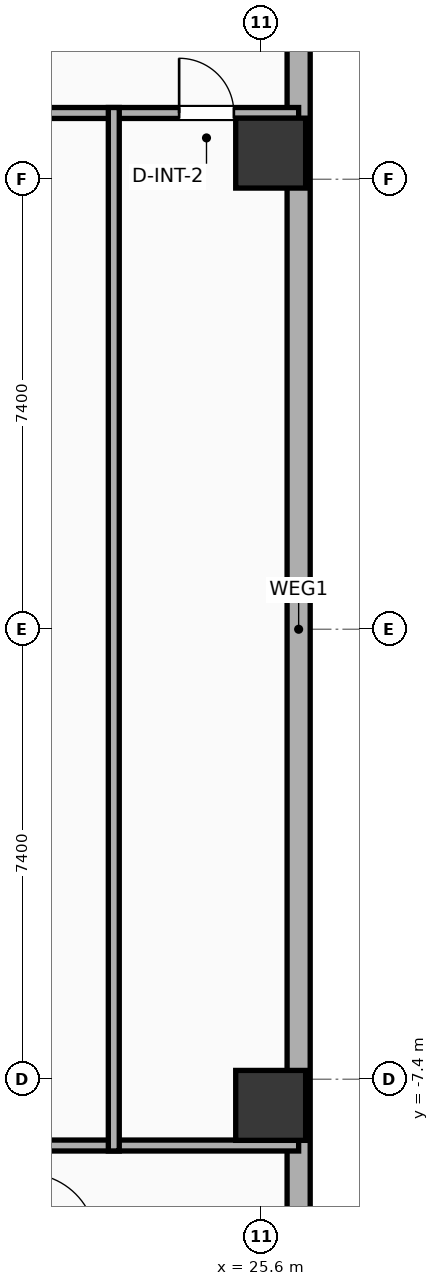
"""IFC4 building model, lengths in metres.
Left out: names, types, materials, properties, quantities, classifications, styles, units other than length and angle.
Written with IfcOpenShell. Run it as: python <this file> out.ifc"""

import sys

from ifc_helpers import new_model, si_unit, direction, frame, frame_2d, origin, origin_2d, place, context, subcontext, project, spatial, rectangle, hollow_rectangle, extrude, element, fill, save


model = new_model("IFC4")
c1 = context("Model", 3, precision=1e-05, world=origin(), true_north=direction((0.0, 1.0)))
c2 = subcontext(c1, "Body", "Model", "MODEL_VIEW")
j1 = project(units=[si_unit("LENGTHUNIT", "METRE"), si_unit("PLANEANGLEUNIT", "RADIAN")], contexts=[c1])
p1 = place(None, origin())
s1 = spatial("IfcSite", under=j1, at=p1, CompositionType="ELEMENT")
p2 = place(p1, origin())
s2 = spatial("IfcBuilding", under=s1, at=p2, CompositionType="ELEMENT")
p3 = place(p2, frame((0.0, 0.0, 68.9)))
s3 = spatial("IfcBuildingStorey", under=s2, at=p3, CompositionType="ELEMENT", Elevation=68.9)
for number, where, z_axis, x_axis in (
    (1, (25.75, -7.83, 0.0), (0.0, 0.0, 1.0), (1.0, 0.0, 0.0)),
    (2, (25.75, 7.83, 0.0), (0.0, 0.0, 1.0), (1.0, 0.0, 0.0)),
):
    element("IfcColumn", number, at=place(p3, frame(where, z_axis=z_axis, x_axis=x_axis)), inside=s3, PredefinedType="COLUMN", context=c2, shape_type="SweptSolid", body=[
        extrude(hollow_rectangle(XDim=1.15, YDim=1.15, WallThickness=0.04, at=origin_2d()), origin(), (0.0, 0.0, 1.0), 3.9),
    ])
p4 = place(p3, frame((26.21, 18.381, 0.0), z_axis=(0.0, 0.0, 1.0), x_axis=(0.0, -1.0, 0.0)))
e3 = element("IfcWall", 3, at=p4, inside=s3, PredefinedType="ELEMENTEDWALL", context=c2, shape_type="SweptSolid", body=[
    extrude(rectangle(XDim=36.763, YDim=0.38, at=frame_2d((18.381, 0.0))), origin(), (0.0, 0.0, 1.0), 3.65),
])
p5 = place(p4, frame((33.187, 0.0, 0.75)))
e4 = element("IfcOpeningElement", 4, at=p5, cuts=e3, PredefinedType="OPENING", context=c2, shape_type="SweptSolid", body=[
    extrude(rectangle(XDim=1.2, YDim=2.05, at=frame_2d((0.6, 1.025))), frame((0.0, 0.2, 0.0), z_axis=(0.0, -1.0, 0.0), x_axis=(1.0, 0.0, 0.0)), (0.0, 0.0, 1.0), 0.4),
])
p6 = place(p3, frame((9.88, 8.49, 0.0), z_axis=(0.0, 0.0, 1.0), x_axis=(1.0, 0.0, 0.0)))
e5 = element("IfcWall", 5, at=p6, inside=s3, PredefinedType="PARTITIONING", context=c2, shape_type="SweptSolid", body=[
    extrude(rectangle(XDim=16.33, YDim=0.18, at=frame_2d((8.165, 0.0))), origin(), (0.0, 0.0, 1.0), 3.65),
])
p7 = place(p6, frame((14.365, 0.0, 0.0)))
e6 = element("IfcOpeningElement", 6, at=p7, cuts=e5, PredefinedType="OPENING", context=c2, shape_type="SweptSolid", body=[
    extrude(rectangle(XDim=0.9, YDim=2.05, at=frame_2d((0.45, 1.025))), frame((0.0, 0.1, 0.0), z_axis=(0.0, -1.0, 0.0), x_axis=(1.0, 0.0, 0.0)), (0.0, 0.0, 1.0), 0.2),
])
p8 = place(p3, frame((9.88, -8.49, 0.0), z_axis=(0.0, 0.0, 1.0), x_axis=(1.0, 0.0, 0.0)))
e7 = element("IfcWall", 7, at=p8, inside=s3, PredefinedType="PARTITIONING", context=c2, shape_type="SweptSolid", body=[
    extrude(rectangle(XDim=16.33, YDim=0.18, at=frame_2d((8.165, 0.0))), origin(), (0.0, 0.0, 1.0), 3.65),
])
p9 = place(p3, frame((23.17, -8.58, 0.0), z_axis=(0.0, 0.0, 1.0), x_axis=(0.0, 1.0, 0.0)))
e8 = element("IfcWall", 8, at=p9, inside=s3, PredefinedType="PARTITIONING", context=c2, shape_type="SweptSolid", body=[
    extrude(rectangle(XDim=17.16, YDim=0.18, at=frame_2d((8.58, 0.0))), origin(), (0.0, 0.0, 1.0), 3.65),
])
p10 = place(p7, origin())
e9 = element("IfcDoor", 9, at=p10, inside=s3, OperationType="SINGLE_SWING_LEFT", PredefinedType="DOOR", context=c2, shape_type="SweptSolid", body=[
    extrude(rectangle(XDim=0.9, YDim=2.05, at=frame_2d((0.45, 1.025))), frame((0.0, 0.025, 0.0), z_axis=(0.0, -1.0, 0.0), x_axis=(1.0, 0.0, 0.0)), (0.0, 0.0, 1.0), 0.05),
])
fill(e6, e9)
save(model, sys.argv[1])
